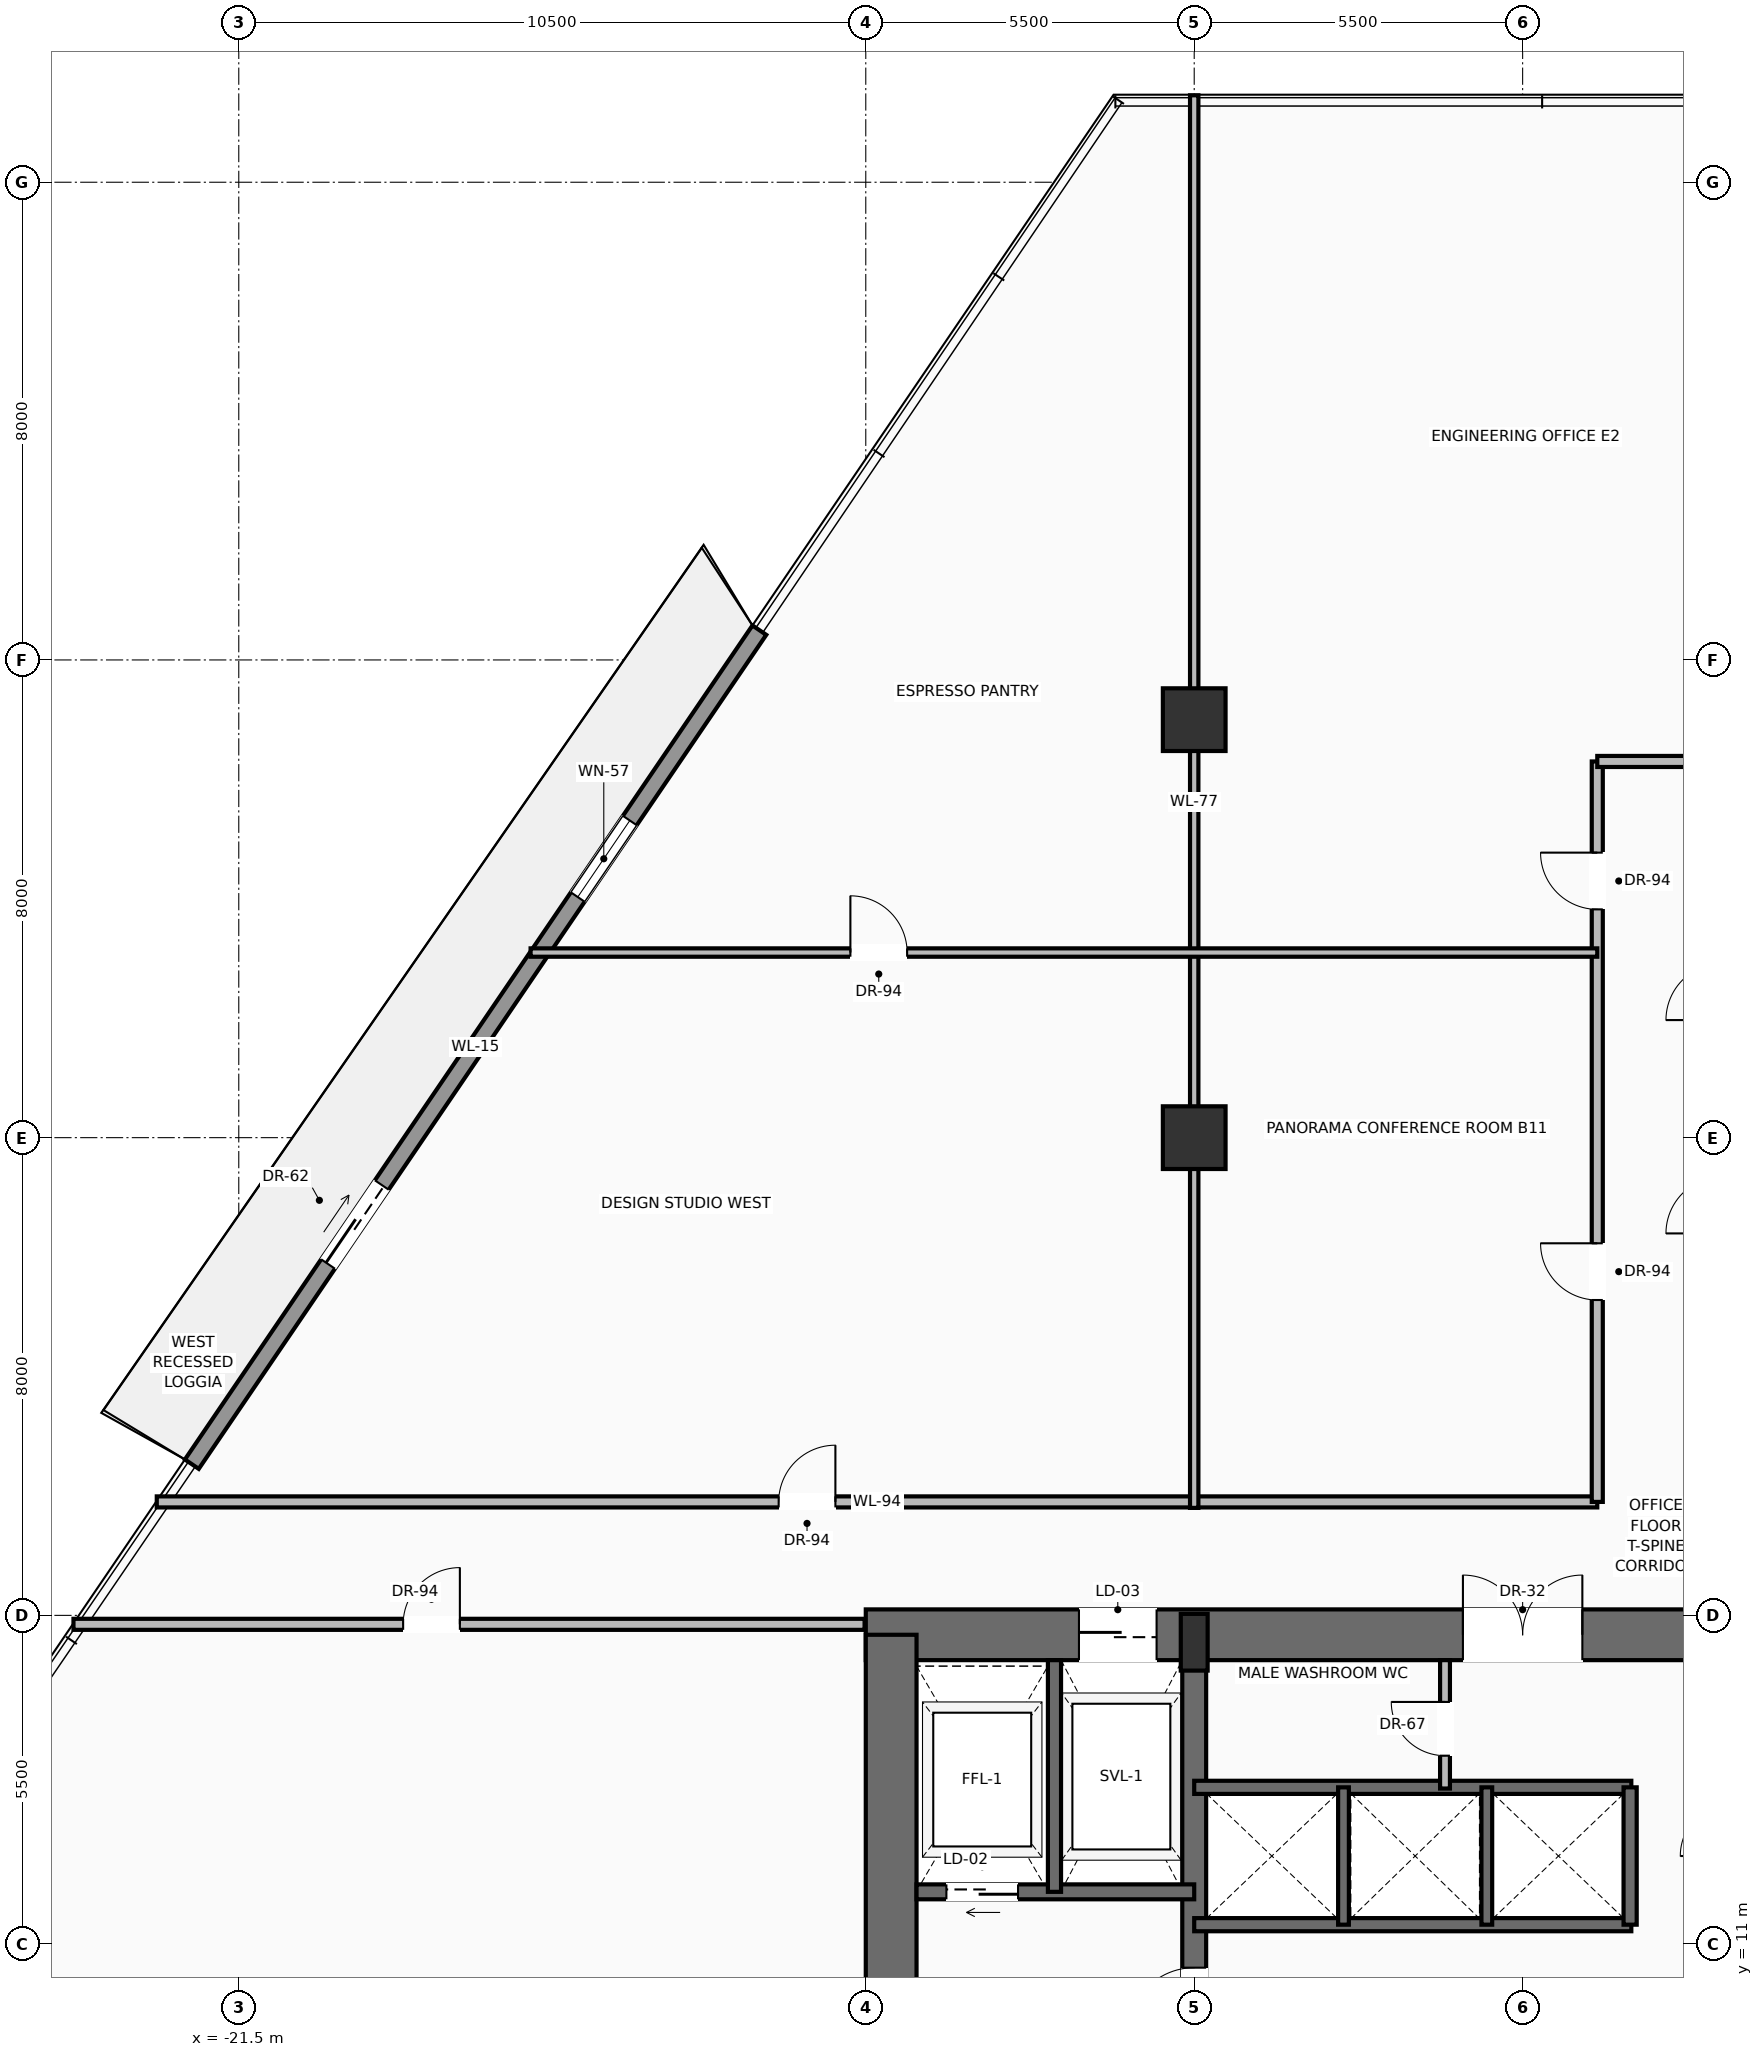
"""IFC4 building model, lengths in metres.
Left out: names, types, materials, properties, quantities, classifications, styles, units other than length and angle.
Written with IfcOpenShell. Run it as: python <this file> out.ifc"""

import sys

from ifc_helpers import new_model, si_unit, direction, frame, frame_2d, origin, origin_2d, place, context, subcontext, project, spatial, rectangle, extrude, source, transform, mapped, element, fill, save


model = new_model("IFC4")
c1 = context("Model", 3, precision=1e-05, world=origin(), true_north=direction((0.0, 1.0)))
c2 = subcontext(c1, "Body", "Model", "MODEL_VIEW")
j1 = project(units=[si_unit("LENGTHUNIT", "METRE"), si_unit("PLANEANGLEUNIT", "RADIAN")], contexts=[c1])
p1 = place(None, origin())
s1 = spatial("IfcSite", under=j1, at=p1, CompositionType="ELEMENT")
p2 = place(p1, origin())
s2 = spatial("IfcBuilding", under=s1, at=p2, CompositionType="ELEMENT")
p3 = place(p2, frame((0.0, 0.0, 57.1)))
s3 = spatial("IfcBuildingStorey", under=s2, at=p3, CompositionType="ELEMENT", Elevation=57.1)
p4 = place(p3, frame((-11.0, 16.175, 0.0), z_axis=(0.0, 0.0, 1.0), x_axis=(1.0, 0.0, 0.0)))
e1 = element("IfcWall", 1, at=p4, inside=s3, PredefinedType="SHEAR", context=c2, shape_type="SweptSolid", body=[
    extrude(rectangle(XDim=22.0, YDim=0.85, at=frame_2d((11.0, 0.0))), origin(), (0.0, 0.0, 1.0), 3.45),
])
p5 = place(p4, frame((3.57, 0.0, 0.0)))
e2 = element("IfcOpeningElement", 2, at=p5, cuts=e1, PredefinedType="OPENING", context=c2, shape_type="SweptSolid", body=[
    extrude(rectangle(XDim=1.3, YDim=2.3, at=frame_2d((0.65, 1.15))), frame((0.0, 0.435, 0.0), z_axis=(0.0, -1.0, 0.0), x_axis=(1.0, 0.0, 0.0)), (0.0, 0.0, 1.0), 0.87),
])
p6 = place(p4, frame((10.0, 0.0, 0.0)))
e3 = element("IfcOpeningElement", 3, at=p6, cuts=e1, PredefinedType="OPENING", context=c2, shape_type="SweptSolid", body=[
    extrude(rectangle(XDim=2.0, YDim=2.4, at=frame_2d((1.0, 1.2))), frame((0.0, 0.435, 0.0), z_axis=(0.0, -1.0, 0.0), x_axis=(1.0, 0.0, 0.0)), (0.0, 0.0, 1.0), 0.87),
])
p7 = place(p3, frame((-10.575, 0.425, 0.0), z_axis=(0.0, 0.0, 1.0), x_axis=(0.0, 1.0, 0.0)))
e4 = element("IfcWall", 4, at=p7, inside=s3, PredefinedType="SHEAR", context=c2, shape_type="SweptSolid", body=[
    extrude(rectangle(XDim=15.75, YDim=0.85, at=frame_2d((7.875, 0.0))), origin(), (0.0, 0.0, 1.0), 3.45),
])
p8 = place(p3, frame((-5.5, 0.425, 0.0), z_axis=(0.0, 0.0, 1.0), x_axis=(0.0, 1.0, 0.0)))
e5 = element("IfcWall", 5, at=p8, inside=s3, PredefinedType="SHEAR", context=c2, shape_type="SweptSolid", body=[
    extrude(rectangle(XDim=15.75, YDim=0.4, at=frame_2d((7.875, 0.0))), origin(), (0.0, 0.0, 1.0), 3.45),
])
p9 = place(p8, frame((9.075, 0.0, 0.0)))
e6 = element("IfcOpeningElement", 6, at=p9, cuts=e5, PredefinedType="OPENING", context=c2, shape_type="SweptSolid", body=[
    extrude(rectangle(XDim=1.1, YDim=2.2, at=frame_2d((0.55, 1.1))), frame((0.0, 0.21, 0.0), z_axis=(0.0, -1.0, 0.0), x_axis=(1.0, 0.0, 0.0)), (0.0, 0.0, 1.0), 0.42),
])
m1 = source(origin(), c2, "Body", "SweptSolid", [
    extrude(rectangle(XDim=0.45, YDim=0.95, at=origin_2d()), origin(), (0.0, 0.0, 1.0), 3.7),
])
p10 = place(p3, frame((-5.5, 16.05, 0.0), z_axis=(0.0, 0.0, 1.0), x_axis=(1.0, 0.0, 0.0)))
e7 = element("IfcColumn", 7, at=p10, inside=s3, PredefinedType="PILASTER", context=c2, shape_type="MappedRepresentation", body=[
    mapped(m1, transform((0.0, 0.0, 0.0), scale=1.0)),
])
m2 = source(origin(), c2, "Body", "SweptSolid", [
    extrude(rectangle(XDim=1.05, YDim=1.05, at=origin_2d()), origin(), (0.0, 0.0, 1.0), 3.7),
])
for number, where, z_axis, x_axis in (
    (8, (-5.5, 24.5, 0.0), (0.0, 0.0, 1.0), (1.0, 0.0, 0.0)),
    (9, (-5.5, 31.5, 0.0), (0.0, 0.0, 1.0), (1.0, 0.0, 0.0)),
):
    element("IfcColumn", number, at=place(p3, frame(where, z_axis=z_axis, x_axis=x_axis)), inside=s3, PredefinedType="COLUMN", context=c2, shape_type="MappedRepresentation", body=[
        mapped(m2, transform((0.0, 0.0, 0.0), scale=1.0)),
    ])
p11 = place(p3, frame((-22.286, 19.032, 0.0), z_axis=(0.0, 0.0, 1.0), x_axis=(0.562555862803, 0.826759276468, 0.0)))
e10 = element("IfcWall", 10, at=p11, inside=s3, PredefinedType="SOLIDWALL", context=c2, shape_type="SweptSolid", body=[
    extrude(rectangle(XDim=16.894, YDim=0.28, at=frame_2d((8.447, 0.0))), origin(), (0.0, 0.0, 1.0), 3.03),
])
p12 = place(p11, frame((4.054, 0.0, 0.0)))
e11 = element("IfcOpeningElement", 11, at=p12, cuts=e10, PredefinedType="OPENING", context=c2, shape_type="SweptSolid", body=[
    extrude(rectangle(XDim=1.6, YDim=2.35, at=frame_2d((0.8, 1.175))), frame((0.0, 0.15, 0.0), z_axis=(0.0, -1.0, 0.0), x_axis=(1.0, 0.0, 0.0)), (0.0, 0.0, 1.0), 0.3),
])
p13 = place(p11, frame((11.488, 0.0, 0.9)))
e12 = element("IfcOpeningElement", 12, at=p13, cuts=e10, PredefinedType="OPENING", context=c2, shape_type="SweptSolid", body=[
    extrude(rectangle(XDim=1.55, YDim=1.85, at=frame_2d((0.775, 0.925))), frame((0.0, 0.15, 0.0), z_axis=(0.0, -1.0, 0.0), x_axis=(1.0, 0.0, 0.0)), (0.0, 0.0, 1.0), 0.3),
])
p14 = place(p3, frame((-5.5, 11.87, 0.0), z_axis=(0.0, 0.0, 1.0), x_axis=(-1.0, 0.0, 0.0)))
e13 = element("IfcWall", 13, at=p14, inside=s3, PredefinedType="SOLIDWALL", context=c2, shape_type="SweptSolid", body=[
    extrude(rectangle(XDim=4.65, YDim=0.25, at=frame_2d((2.325, 0.0))), origin(), (0.0, 0.0, 1.0), 3.45),
])
p15 = place(p14, frame((2.95, 0.0, 0.0)))
e14 = element("IfcOpeningElement", 14, at=p15, cuts=e13, PredefinedType="OPENING", context=c2, shape_type="SweptSolid", body=[
    extrude(rectangle(XDim=1.2, YDim=2.25, at=frame_2d((0.6, 1.125))), frame((0.0, 0.135, 0.0), z_axis=(0.0, -1.0, 0.0), x_axis=(1.0, 0.0, 0.0)), (0.0, 0.0, 1.0), 0.27),
])
p16 = place(p3, frame((-7.84, 11.87, 0.0), z_axis=(0.0, 0.0, 1.0), x_axis=(0.0, 1.0, 0.0)))
e15 = element("IfcWall", 15, at=p16, inside=s3, PredefinedType="SOLIDWALL", context=c2, shape_type="SweptSolid", body=[
    extrude(rectangle(XDim=3.88, YDim=0.22, at=frame_2d((1.94, 0.0))), origin(), (0.0, 0.0, 1.0), 3.45),
])
for number, where, z_axis, x_axis in (
    (16, (-5.5, 11.32, 0.0), (0.0, 0.0, 1.0), (1.0, 0.0, 0.0)),
    (17, (-5.5, 13.62, 0.0), (0.0, 0.0, 1.0), (1.0, 0.0, 0.0)),
):
    element("IfcWall", number, at=place(p3, frame(where, z_axis=z_axis, x_axis=x_axis)), inside=s3, PredefinedType="SOLIDWALL", context=c2, shape_type="SweptSolid", body=[
        extrude(rectangle(XDim=7.32, YDim=0.22, at=frame_2d((3.66, 0.0))), origin(), (0.0, 0.0, 1.0), 3.45),
    ])
p17 = place(p3, frame((1.8, 11.32, 0.0), z_axis=(0.0, 0.0, 1.0), x_axis=(0.0, 1.0, 0.0)))
e18 = element("IfcWall", 18, at=p17, inside=s3, PredefinedType="SOLIDWALL", context=c2, shape_type="SweptSolid", body=[
    extrude(rectangle(XDim=2.3, YDim=0.22, at=frame_2d((1.15, 0.0))), origin(), (0.0, 0.0, 1.0), 3.45),
])
for number, where, z_axis, x_axis in (
    (19, (-3.0, 11.32, 0.0), (0.0, 0.0, 1.0), (0.0, 1.0, 0.0)),
    (20, (-0.6, 11.32, 0.0), (0.0, 0.0, 1.0), (0.0, 1.0, 0.0)),
):
    element("IfcWall", number, at=place(p3, frame(where, z_axis=z_axis, x_axis=x_axis)), inside=s3, PredefinedType="SOLIDWALL", context=c2, shape_type="SweptSolid", body=[
        extrude(rectangle(XDim=2.3, YDim=0.18, at=frame_2d((1.15, 0.0))), origin(), (0.0, 0.0, 1.0), 3.45),
    ])
p18 = place(p3, frame((-1.3, 13.6, 0.0), z_axis=(0.0, 0.0, 1.0), x_axis=(0.0, 1.0, 0.0)))
e21 = element("IfcWall", 21, at=p18, inside=s3, PredefinedType="PARTITIONING", context=c2, shape_type="SweptSolid", body=[
    extrude(rectangle(XDim=2.15, YDim=0.165, at=frame_2d((1.075, 0.0))), origin(), (0.0, 0.0, 1.0), 3.442),
])
p19 = place(p18, frame((0.55, 0.0, 0.0)))
e22 = element("IfcOpeningElement", 22, at=p19, cuts=e21, PredefinedType="OPENING", context=c2, shape_type="SweptSolid", body=[
    extrude(rectangle(XDim=0.9, YDim=2.1, at=frame_2d((0.45, 1.05))), frame((0.0, 0.093, 0.0), z_axis=(0.0, -1.0, 0.0), x_axis=(1.0, 0.0, 0.0)), (0.0, 0.0, 1.0), 0.185),
])
p20 = place(p3, frame((-24.268, 16.35, 0.0), z_axis=(0.0, 0.0, 1.0), x_axis=(1.0, 0.0, 0.0)))
e23 = element("IfcWall", 23, at=p20, inside=s3, PredefinedType="PARTITIONING", context=c2, shape_type="SweptSolid", body=[
    extrude(rectangle(XDim=13.248, YDim=0.185, at=frame_2d((6.624, 0.0))), origin(), (0.0, 0.0, 1.0), 2.747),
])
p21 = place(p20, frame((5.521, 0.0, 0.0)))
e24 = element("IfcOpeningElement", 24, at=p21, cuts=e23, PredefinedType="OPENING", context=c2, shape_type="SweptSolid", body=[
    extrude(rectangle(XDim=0.95, YDim=2.2, at=frame_2d((0.475, 1.1))), frame((0.0, 0.103, 0.0), z_axis=(0.0, -1.0, 0.0), x_axis=(1.0, 0.0, 0.0)), (0.0, 0.0, 1.0), 0.205),
])
p22 = place(p3, frame((-22.873, 18.4, 0.0), z_axis=(0.0, 0.0, 1.0), x_axis=(1.0, 0.0, 0.0)))
e25 = element("IfcWall", 25, at=p22, inside=s3, PredefinedType="PARTITIONING", context=c2, shape_type="SweptSolid", body=[
    extrude(rectangle(XDim=24.123, YDim=0.185, at=frame_2d((12.062, 0.0))), origin(), (0.0, 0.0, 1.0), 2.747),
])
p23 = place(p22, frame((10.415, 0.0, 0.0)))
e26 = element("IfcOpeningElement", 26, at=p23, cuts=e25, PredefinedType="OPENING", context=c2, shape_type="SweptSolid", body=[
    extrude(rectangle(XDim=0.95, YDim=2.2, at=frame_2d((0.475, 1.1))), frame((0.0, 0.103, 0.0), z_axis=(0.0, -1.0, 0.0), x_axis=(1.0, 0.0, 0.0)), (0.0, 0.0, 1.0), 0.205),
])
p24 = place(p3, frame((1.25, 18.4, 0.0), z_axis=(0.0, 0.0, 1.0), x_axis=(0.0, 1.0, 0.0)))
e27 = element("IfcWall", 27, at=p24, inside=s3, PredefinedType="PARTITIONING", context=c2, shape_type="SweptSolid", body=[
    extrude(rectangle(XDim=12.4, YDim=0.185, at=frame_2d((6.2, 0.0))), origin(), (0.0, 0.0, 1.0), 2.747),
])
p25 = place(p24, frame((3.381, 0.0, 0.0)))
e28 = element("IfcOpeningElement", 28, at=p25, cuts=e27, PredefinedType="OPENING", context=c2, shape_type="SweptSolid", body=[
    extrude(rectangle(XDim=0.95, YDim=2.2, at=frame_2d((0.475, 1.1))), frame((0.0, 0.103, 0.0), z_axis=(0.0, -1.0, 0.0), x_axis=(1.0, 0.0, 0.0)), (0.0, 0.0, 1.0), 0.205),
])
p26 = place(p24, frame((9.923, 0.0, 0.0)))
e29 = element("IfcOpeningElement", 29, at=p26, cuts=e27, PredefinedType="OPENING", context=c2, shape_type="SweptSolid", body=[
    extrude(rectangle(XDim=0.95, YDim=2.2, at=frame_2d((0.475, 1.1))), frame((0.0, 0.103, 0.0), z_axis=(0.0, -1.0, 0.0), x_axis=(1.0, 0.0, 0.0)), (0.0, 0.0, 1.0), 0.205),
])
p27 = place(p3, frame((1.25, 30.8, 0.0), z_axis=(0.0, 0.0, 1.0), x_axis=(1.0, 0.0, 0.0)))
e30 = element("IfcWall", 30, at=p27, inside=s3, PredefinedType="PARTITIONING", context=c2, shape_type="SweptSolid", body=[
    extrude(rectangle(XDim=2.1, YDim=0.185, at=frame_2d((1.05, 0.0))), origin(), (0.0, 0.0, 1.0), 3.442),
])
p28 = place(p3, frame((-5.5, 18.3, 0.0), z_axis=(0.0, 0.0, 1.0), x_axis=(0.0, 1.0, 0.0)))
e31 = element("IfcWall", 31, at=p28, inside=s3, PredefinedType="PARTITIONING", context=c2, shape_type="SweptSolid", body=[
    extrude(rectangle(XDim=23.656, YDim=0.14, at=frame_2d((11.828, 0.0))), origin(), (0.0, 0.0, 1.0), 2.747),
])
p29 = place(p3, frame((-16.613, 27.6, 0.0), z_axis=(0.0, 0.0, 1.0), x_axis=(1.0, 0.0, 0.0)))
e32 = element("IfcWall", 32, at=p29, inside=s3, PredefinedType="PARTITIONING", context=c2, shape_type="SweptSolid", body=[
    extrude(rectangle(XDim=17.863, YDim=0.14, at=frame_2d((8.932, 0.0))), origin(), (0.0, 0.0, 1.0), 2.747),
])
p30 = place(p29, frame((5.355, 0.0, 0.0)))
e33 = element("IfcOpeningElement", 33, at=p30, cuts=e32, PredefinedType="OPENING", context=c2, shape_type="SweptSolid", body=[
    extrude(rectangle(XDim=0.95, YDim=2.2, at=frame_2d((0.475, 1.1))), frame((0.0, 0.08, 0.0), z_axis=(0.0, -1.0, 0.0), x_axis=(1.0, 0.0, 0.0)), (0.0, 0.0, 1.0), 0.16),
])
m3 = source(origin(), c2, "Body", "SweptSolid", [
    extrude(rectangle(XDim=1.6, YDim=2.35, at=frame_2d((0.8, 1.175))), frame((0.0, 0.025, 0.0), z_axis=(0.0, -1.0, 0.0), x_axis=(1.0, 0.0, 0.0)), (0.0, 0.0, 1.0), 0.05),
])
p31 = place(p12, origin())
e34 = element("IfcDoor", 34, at=p31, inside=s3, OperationType="SLIDING_TO_LEFT", PredefinedType="DOOR", context=c2, shape_type="MappedRepresentation", body=[
    mapped(m3, transform((0.0, 0.0, 0.0), scale=1.0)),
])
fill(e11, e34)
m4 = source(origin(), c2, "Body", "SweptSolid", [
    extrude(rectangle(XDim=1.55, YDim=1.85, at=frame_2d((0.775, 0.925))), frame((0.0, 0.03, 0.0), z_axis=(0.0, -1.0, 0.0), x_axis=(1.0, 0.0, 0.0)), (0.0, 0.0, 1.0), 0.06),
])
p32 = place(p13, origin())
e35 = element("IfcWindow", 35, at=p32, inside=s3, PartitioningType="SINGLE_PANEL", PredefinedType="WINDOW", context=c2, shape_type="MappedRepresentation", body=[
    mapped(m4, transform((0.0, 0.0, 0.0), scale=1.0)),
])
fill(e12, e35)
m5 = source(origin(), c2, "Body", "SweptSolid", [
    extrude(rectangle(XDim=1.1, YDim=2.2, at=frame_2d((0.55, 1.1))), frame((0.0, 0.025, 0.0), z_axis=(0.0, -1.0, 0.0), x_axis=(1.0, 0.0, 0.0)), (0.0, 0.0, 1.0), 0.05),
])
p33 = place(p9, origin())
e36 = element("IfcDoor", 36, at=p33, inside=s3, OperationType="SINGLE_SWING_LEFT", PredefinedType="DOOR", context=c2, shape_type="MappedRepresentation", body=[
    mapped(m5, transform((0.0, 0.0, 0.0), scale=1.0)),
])
fill(e6, e36)
m6 = source(origin(), c2, "Body", "SweptSolid", [
    extrude(rectangle(XDim=1.2, YDim=2.25, at=frame_2d((0.6, 1.125))), frame((0.0, 0.025, 0.0), z_axis=(0.0, -1.0, 0.0), x_axis=(1.0, 0.0, 0.0)), (0.0, 0.0, 1.0), 0.05),
])
p34 = place(p15, origin())
e37 = element("IfcDoor", 37, at=p34, inside=s3, OperationType="SLIDING_TO_LEFT", PredefinedType="DOOR", context=c2, shape_type="MappedRepresentation", body=[
    mapped(m6, transform((0.0, 0.0, 0.0), scale=1.0)),
])
fill(e14, e37)
m7 = source(origin(), c2, "Body", "SweptSolid", [
    extrude(rectangle(XDim=1.3, YDim=2.3, at=frame_2d((0.65, 1.15))), frame((0.0, 0.025, 0.0), z_axis=(0.0, -1.0, 0.0), x_axis=(1.0, 0.0, 0.0)), (0.0, 0.0, 1.0), 0.05),
])
p35 = place(p5, origin())
e38 = element("IfcDoor", 38, at=p35, inside=s3, OperationType="SLIDING_TO_RIGHT", PredefinedType="DOOR", context=c2, shape_type="MappedRepresentation", body=[
    mapped(m7, transform((0.0, 0.0, 0.0), scale=1.0)),
])
fill(e2, e38)
m8 = source(origin(), c2, "Body", "SweptSolid", [
    extrude(rectangle(XDim=2.0, YDim=2.4, at=frame_2d((1.0, 1.2))), frame((0.0, 0.025, 0.0), z_axis=(0.0, -1.0, 0.0), x_axis=(1.0, 0.0, 0.0)), (0.0, 0.0, 1.0), 0.05),
])
p36 = place(p6, origin())
e39 = element("IfcDoor", 39, at=p36, inside=s3, OperationType="DOUBLE_DOOR_SINGLE_SWING", PredefinedType="DOOR", context=c2, shape_type="MappedRepresentation", body=[
    mapped(m8, transform((0.0, 0.0, 0.0), scale=1.0)),
])
fill(e3, e39)
m9 = source(origin(), c2, "Body", "SweptSolid", [
    extrude(rectangle(XDim=0.9, YDim=2.1, at=frame_2d((0.45, 1.05))), frame((0.0, 0.025, 0.0), z_axis=(0.0, -1.0, 0.0), x_axis=(1.0, 0.0, 0.0)), (0.0, 0.0, 1.0), 0.05),
])
p37 = place(p19, origin())
e40 = element("IfcDoor", 40, at=p37, inside=s3, OperationType="SINGLE_SWING_RIGHT", PredefinedType="DOOR", context=c2, shape_type="MappedRepresentation", body=[
    mapped(m9, transform((0.0, 0.0, 0.0), scale=1.0)),
])
fill(e22, e40)
m10 = source(origin(), c2, "Body", "SweptSolid", [
    extrude(rectangle(XDim=0.95, YDim=2.2, at=frame_2d((0.475, 1.1))), frame((0.0, 0.025, 0.0), z_axis=(0.0, -1.0, 0.0), x_axis=(1.0, 0.0, 0.0)), (0.0, 0.0, 1.0), 0.05),
])
p38 = place(p21, origin())
e41 = element("IfcDoor", 41, at=p38, inside=s3, OperationType="SINGLE_SWING_RIGHT", PredefinedType="DOOR", context=c2, shape_type="MappedRepresentation", body=[
    mapped(m10, transform((0.0, 0.0, 0.0), scale=1.0)),
])
fill(e24, e41)
p39 = place(p23, origin())
e42 = element("IfcDoor", 42, at=p39, inside=s3, OperationType="SINGLE_SWING_RIGHT", PredefinedType="DOOR", context=c2, shape_type="MappedRepresentation", body=[
    mapped(m10, transform((0.0, 0.0, 0.0), scale=1.0)),
])
fill(e26, e42)
p40 = place(p25, origin())
e43 = element("IfcDoor", 43, at=p40, inside=s3, OperationType="SINGLE_SWING_RIGHT", PredefinedType="DOOR", context=c2, shape_type="MappedRepresentation", body=[
    mapped(m10, transform((0.0, 0.0, 0.0), scale=1.0)),
])
fill(e28, e43)
p41 = place(p30, origin())
e44 = element("IfcDoor", 44, at=p41, inside=s3, OperationType="SINGLE_SWING_LEFT", PredefinedType="DOOR", context=c2, shape_type="MappedRepresentation", body=[
    mapped(m10, transform((0.0, 0.0, 0.0), scale=1.0)),
])
fill(e33, e44)
p42 = place(p26, origin())
e45 = element("IfcDoor", 45, at=p42, inside=s3, OperationType="SINGLE_SWING_RIGHT", PredefinedType="DOOR", context=c2, shape_type="MappedRepresentation", body=[
    mapped(m10, transform((0.0, 0.0, 0.0), scale=1.0)),
])
fill(e29, e45)
save(model, sys.argv[1])
